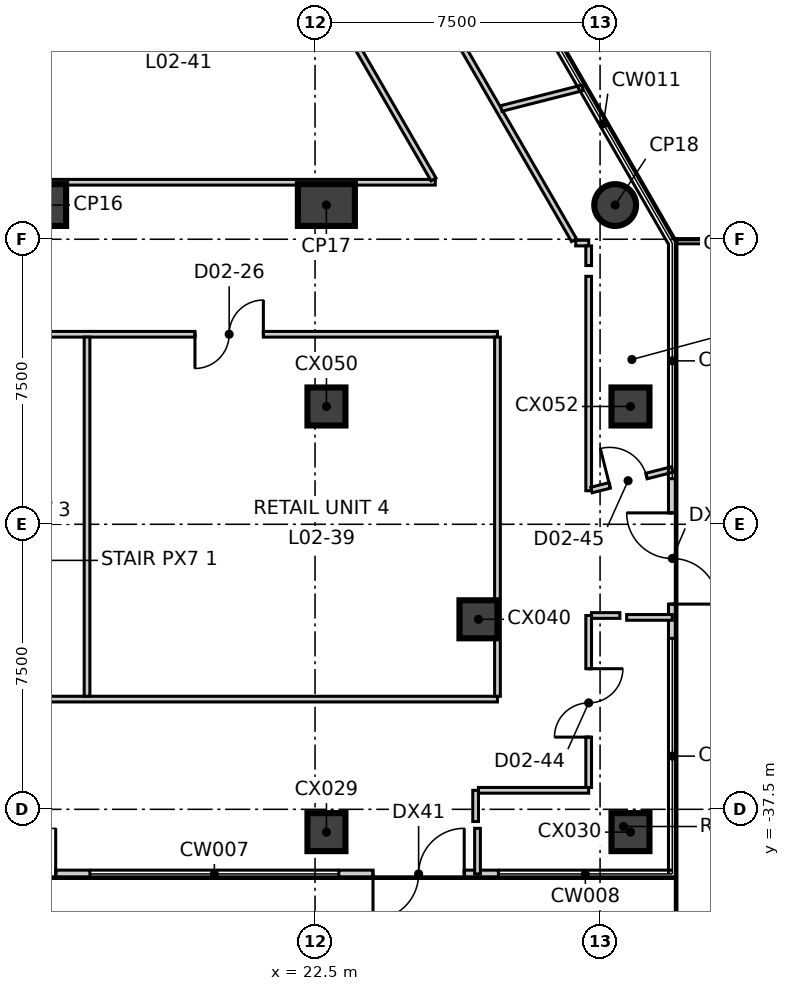
"""IFC4 building model, lengths in metres.
Left out: names, types, materials, properties, quantities, classifications, styles, units other than length and angle.
Written with IfcOpenShell. Run it as: python <this file> out.ifc"""

import sys

from ifc_helpers import new_model, si_unit, direction, frame, frame_2d, origin, origin_2d, place, context, subcontext, project, spatial, rectangle, circle, extrude, element, fill, save


model = new_model("IFC4")
c1 = context("Model", 3, precision=1e-05, world=origin(), true_north=direction((0.0, 1.0)))
c2 = subcontext(c1, "Body", "Model", "MODEL_VIEW")
j1 = project(units=[si_unit("LENGTHUNIT", "METRE"), si_unit("PLANEANGLEUNIT", "RADIAN")], contexts=[c1])
p1 = place(None, origin())
s1 = spatial("IfcSite", under=j1, at=p1, CompositionType="ELEMENT")
p2 = place(p1, origin())
s2 = spatial("IfcBuilding", under=s1, at=p2, CompositionType="ELEMENT")
p3 = place(p2, frame((0.0, 0.0, 14.5)))
s3 = spatial("IfcBuildingStorey", under=s2, at=p3, CompositionType="ELEMENT", Elevation=14.5)
for number, where, z_axis, x_axis in (
    (1, (15.199, -21.6, -0.4), (0.0, 0.0, 1.0), (1.0, 0.0, 0.0)),
    (2, (22.798, -21.6, -0.4), (0.0, 0.0, 1.0), (1.0, 0.0, 0.0)),
):
    element("IfcColumn", number, at=place(p3, frame(where, z_axis=z_axis, x_axis=x_axis)), inside=s3, PredefinedType="COLUMN", context=c2, shape_type="SweptSolid", body=[
        extrude(rectangle(XDim=1.5, YDim=1.1, at=origin_2d()), origin(), (0.0, 0.0, 1.0), 5.4),
    ])
p4 = place(p3, frame((30.397, -21.6, -0.4), z_axis=(0.0, 0.0, 1.0), x_axis=(1.0, 0.0, 0.0)))
e3 = element("IfcColumn", 3, at=p4, inside=s3, PredefinedType="COLUMN", context=c2, shape_type="SweptSolid", body=[
    extrude(circle(Radius=0.55, at=origin_2d()), origin(), (0.0, 0.0, 1.0), 5.4),
])
for number, where, z_axis, x_axis in (
    (4, (22.8, -38.1, -0.4), (0.0, 0.0, 1.0), (1.0, 0.0, 0.0)),
    (5, (30.8, -38.1, -0.4), (0.0, 0.0, 1.0), (1.0, 0.0, 0.0)),
    (6, (26.8, -32.5, -0.4), (0.0, 0.0, 1.0), (1.0, 0.0, 0.0)),
    (7, (22.8, -26.9, -0.4), (0.0, 0.0, 1.0), (1.0, 0.0, 0.0)),
    (8, (30.8, -26.9, -0.4), (0.0, 0.0, 1.0), (1.0, 0.0, 0.0)),
):
    element("IfcColumn", number, at=place(p3, frame(where, z_axis=z_axis, x_axis=x_axis)), inside=s3, PredefinedType="COLUMN", context=c2, shape_type="SweptSolid", body=[
        extrude(rectangle(XDim=1.0, YDim=1.0, at=origin_2d()), origin(), (0.0, 0.0, 1.0), 5.4),
    ])
p5 = place(p3, frame((12.375, -39.2, 0.0), z_axis=(0.0, 0.0, 1.0), x_axis=(1.0, 0.0, 0.0)))
e9 = element("IfcWall", 9, at=p5, inside=s3, PredefinedType="ELEMENTEDWALL", context=c2, shape_type="SweptSolid", body=[
    extrude(rectangle(XDim=4.2, YDim=0.2, at=frame_2d((2.1, 0.0))), origin(), (0.0, 0.0, 1.0), 5.0),
])
p6 = place(p5, frame((0.9, 0.0, 0.0)))
e10 = element("IfcOpeningElement", 10, at=p6, cuts=e9, PredefinedType="OPENING", context=c2, shape_type="SweptSolid", body=[
    extrude(rectangle(XDim=2.4, YDim=2.4, at=frame_2d((1.2, 1.2))), frame((0.0, 0.11, 0.0), z_axis=(0.0, -1.0, 0.0), x_axis=(1.0, 0.0, 0.0)), (0.0, 0.0, 1.0), 0.22),
])
p7 = place(p3, frame((23.125, -39.2, 0.0), z_axis=(0.0, 0.0, 1.0), x_axis=(1.0, 0.0, 0.0)))
e11 = element("IfcWall", 11, at=p7, inside=s3, PredefinedType="ELEMENTEDWALL", context=c2, shape_type="SweptSolid", body=[
    extrude(rectangle(XDim=4.2, YDim=0.2, at=frame_2d((2.1, 0.0))), origin(), (0.0, 0.0, 1.0), 5.0),
])
p8 = place(p7, frame((0.9, 0.0, 0.0)))
e12 = element("IfcOpeningElement", 12, at=p8, cuts=e11, PredefinedType="OPENING", context=c2, shape_type="SweptSolid", body=[
    extrude(rectangle(XDim=2.4, YDim=2.4, at=frame_2d((1.2, 1.2))), frame((0.0, 0.11, 0.0), z_axis=(0.0, -1.0, 0.0), x_axis=(1.0, 0.0, 0.0)), (0.0, 0.0, 1.0), 0.22),
])
p9 = place(p3, frame((31.9, -33.0, 0.0), z_axis=(0.0, 0.0, 1.0), x_axis=(0.0, 1.0, 0.0)))
e13 = element("IfcWall", 13, at=p9, inside=s3, PredefinedType="ELEMENTEDWALL", context=c2, shape_type="SweptSolid", body=[
    extrude(rectangle(XDim=4.2, YDim=0.2, at=frame_2d((2.1, 0.0))), origin(), (0.0, 0.0, 1.0), 5.0),
])
p10 = place(p9, frame((0.9, 0.0, 0.0)))
e14 = element("IfcOpeningElement", 14, at=p10, cuts=e13, PredefinedType="OPENING", context=c2, shape_type="SweptSolid", body=[
    extrude(rectangle(XDim=2.4, YDim=2.4, at=frame_2d((1.2, 1.2))), frame((0.0, 0.11, 0.0), z_axis=(0.0, -1.0, 0.0), x_axis=(1.0, 0.0, 0.0)), (0.0, 0.0, 1.0), 0.22),
])
p11 = place(p3, frame((29.358, -22.6, 0.0), z_axis=(0.0, 0.0, 1.0), x_axis=(1.0, 0.0, 0.0)))
e15 = element("IfcWall", 15, at=p11, inside=s3, PredefinedType="PARTITIONING", context=c2, shape_type="SweptSolid", body=[
    extrude(rectangle(XDim=0.342, YDim=0.15, at=frame_2d((0.171, 0.0))), origin(), (0.0, 0.0, 1.0), 5.0),
])
p12 = place(p3, frame((13.0, -34.6, 0.0), z_axis=(0.0, 0.0, 1.0), x_axis=(1.0, 0.0, 0.0)))
e16 = element("IfcWall", 16, at=p12, inside=s3, PredefinedType="PARTITIONING", context=c2, shape_type="SweptSolid", body=[
    extrude(rectangle(XDim=14.3, YDim=0.15, at=frame_2d((7.15, 0.0))), origin(), (0.0, 0.0, 1.0), 5.0),
])
p13 = place(p3, frame((9.6, -25.0, 0.0), z_axis=(0.0, 0.0, 1.0), x_axis=(1.0, 0.0, 0.0)))
e17 = element("IfcWall", 17, at=p13, inside=s3, PredefinedType="PARTITIONING", context=c2, shape_type="SweptSolid", body=[
    extrude(rectangle(XDim=17.7, YDim=0.15, at=frame_2d((8.85, 0.0))), origin(), (0.0, 0.0, 1.0), 5.0),
])
p14 = place(p13, frame((3.43, 0.0, 0.0)))
e18 = element("IfcOpeningElement", 18, at=p14, cuts=e17, PredefinedType="OPENING", context=c2, shape_type="SweptSolid", body=[
    extrude(rectangle(XDim=1.8, YDim=2.1, at=frame_2d((0.9, 1.05))), frame((0.0, 0.085, 0.0), z_axis=(0.0, -1.0, 0.0), x_axis=(1.0, 0.0, 0.0)), (0.0, 0.0, 1.0), 0.17),
])
p15 = place(p13, frame((9.74, 0.0, 0.0)))
e19 = element("IfcOpeningElement", 19, at=p15, cuts=e17, PredefinedType="OPENING", context=c2, shape_type="SweptSolid", body=[
    extrude(rectangle(XDim=1.8, YDim=2.1, at=frame_2d((0.9, 1.05))), frame((0.0, 0.085, 0.0), z_axis=(0.0, -1.0, 0.0), x_axis=(1.0, 0.0, 0.0)), (0.0, 0.0, 1.0), 0.17),
])
for number, where, z_axis, x_axis in (
    (20, (27.3, -34.525, 0.0), (0.0, 0.0, 1.0), (0.0, 1.0, 0.0)),
    (21, (16.5, -34.525, 0.0), (0.0, 0.0, 1.0), (0.0, 1.0, 0.0)),
):
    element("IfcWall", number, at=place(p3, frame(where, z_axis=z_axis, x_axis=x_axis)), inside=s3, PredefinedType="PARTITIONING", context=c2, shape_type="SweptSolid", body=[
        extrude(rectangle(XDim=9.45, YDim=0.15, at=frame_2d((4.725, 0.0))), origin(), (0.0, 0.0, 1.0), 5.0),
    ])
p16 = place(p3, frame((26.775, -39.2, 0.0), z_axis=(0.0, 0.0, 1.0), x_axis=(0.0, 1.0, 0.0)))
e22 = element("IfcWall", 22, at=p16, inside=s3, PredefinedType="PARTITIONING", context=c2, shape_type="SweptSolid", body=[
    extrude(rectangle(XDim=1.2, YDim=0.15, at=frame_2d((0.6, 0.0))), origin(), (0.0, 0.0, 1.0), 5.0),
])
p17 = place(p3, frame((26.725, -37.821, 0.0), z_axis=(0.0, 0.0, 1.0), x_axis=(0.0, 1.0, 0.0)))
e23 = element("IfcWall", 23, at=p17, inside=s3, PredefinedType="PARTITIONING", context=c2, shape_type="SweptSolid", body=[
    extrude(rectangle(XDim=0.821, YDim=0.15, at=frame_2d((0.411, 0.0))), origin(), (0.0, 0.0, 1.0), 5.0),
])
p18 = place(p3, frame((26.8, -37.0, 0.0), z_axis=(0.0, 0.0, 1.0), x_axis=(1.0, 0.0, 0.0)))
e24 = element("IfcWall", 24, at=p18, inside=s3, PredefinedType="PARTITIONING", context=c2, shape_type="SweptSolid", body=[
    extrude(rectangle(XDim=2.9, YDim=0.15, at=frame_2d((1.45, 0.0))), origin(), (0.0, 0.0, 1.0), 5.0),
])
p19 = place(p3, frame((29.7, -36.925, 0.0), z_axis=(0.0, 0.0, 1.0), x_axis=(0.0, 1.0, 0.0)))
e25 = element("IfcWall", 25, at=p19, inside=s3, PredefinedType="PARTITIONING", context=c2, shape_type="SweptSolid", body=[
    extrude(rectangle(XDim=4.525, YDim=0.15, at=frame_2d((2.263, 0.0))), origin(), (0.0, 0.0, 1.0), 5.0),
])
p20 = place(p19, frame((1.325, 0.0, 0.0)))
e26 = element("IfcOpeningElement", 26, at=p20, cuts=e25, PredefinedType="OPENING", context=c2, shape_type="SweptSolid", body=[
    extrude(rectangle(XDim=1.8, YDim=2.1, at=frame_2d((0.9, 1.05))), frame((0.0, 0.085, 0.0), z_axis=(0.0, -1.0, 0.0), x_axis=(1.0, 0.0, 0.0)), (0.0, 0.0, 1.0), 0.17),
])
p21 = place(p3, frame((29.7, -29.117, 0.0), z_axis=(0.0, 0.0, 1.0), x_axis=(0.0, 1.0, 0.0)))
e27 = element("IfcWall", 27, at=p21, inside=s3, PredefinedType="PARTITIONING", context=c2, shape_type="SweptSolid", body=[
    extrude(rectangle(XDim=5.642, YDim=0.15, at=frame_2d((2.821, 0.0))), origin(), (0.0, 0.0, 1.0), 5.0),
])
p22 = place(p3, frame((29.7, -23.192, 0.0), z_axis=(0.0, 0.0, 1.0), x_axis=(0.0, 1.0, 0.0)))
e28 = element("IfcWall", 28, at=p22, inside=s3, PredefinedType="PARTITIONING", context=c2, shape_type="SweptSolid", body=[
    extrude(rectangle(XDim=0.517, YDim=0.15, at=frame_2d((0.258, 0.0))), origin(), (0.0, 0.0, 1.0), 5.0),
])
p23 = place(p3, frame((29.775, -32.4, 0.0), z_axis=(0.0, 0.0, 1.0), x_axis=(1.0, 0.0, 0.0)))
e29 = element("IfcWall", 29, at=p23, inside=s3, PredefinedType="PARTITIONING", context=c2, shape_type="SweptSolid", body=[
    extrude(rectangle(XDim=0.746, YDim=0.15, at=frame_2d((0.373, 0.0))), origin(), (0.0, 0.0, 1.0), 5.0),
])
p24 = place(p3, frame((30.7, -32.45, 0.0), z_axis=(0.0, 0.0, 1.0), x_axis=(1.0, 0.0, 0.0)))
e30 = element("IfcWall", 30, at=p24, inside=s3, PredefinedType="PARTITIONING", context=c2, shape_type="SweptSolid", body=[
    extrude(rectangle(XDim=1.2, YDim=0.15, at=frame_2d((0.6, 0.0))), origin(), (0.0, 0.0, 1.0), 5.0),
])
p25 = place(p3, frame((24.509, -14.2, 0.0), z_axis=(0.0, 0.0, 1.0), x_axis=(0.499960629411, -0.866048133212, 0.0)))
e31 = element("IfcWall", 31, at=p25, inside=s3, PredefinedType="PARTITIONING", context=c2, shape_type="SweptSolid", body=[
    extrude(rectangle(XDim=9.613, YDim=0.15, at=frame_2d((4.806, 0.0))), origin(), (0.0, 0.0, 1.0), 5.0),
])
p26 = place(p3, frame((27.4, -19.059, 0.0), z_axis=(0.0, 0.0, 1.0), x_axis=(0.969159133182, 0.246435741258, 0.0)))
e32 = element("IfcWall", 32, at=p26, inside=s3, PredefinedType="PARTITIONING", context=c2, shape_type="SweptSolid", body=[
    extrude(rectangle(XDim=2.208, YDim=0.15, at=frame_2d((1.104, 0.0))), origin(), (0.0, 0.0, 1.0), 5.0),
])
p27 = place(p3, frame((29.775, -29.098, 0.0), z_axis=(0.0, 0.0, 1.0), x_axis=(0.969218538946, 0.246201997887, 0.0)))
e33 = element("IfcWall", 33, at=p27, inside=s3, PredefinedType="PARTITIONING", context=c2, shape_type="SweptSolid", body=[
    extrude(rectangle(XDim=2.192, YDim=0.15, at=frame_2d((1.096, 0.0))), origin(), (0.0, 0.0, 1.0), 5.0),
])
p28 = place(p27, frame((0.493, 0.0, 0.0)))
e34 = element("IfcOpeningElement", 34, at=p28, cuts=e33, PredefinedType="OPENING", context=c2, shape_type="SweptSolid", body=[
    extrude(rectangle(XDim=1.0, YDim=2.1, at=frame_2d((0.5, 1.05))), frame((0.0, 0.085, 0.0), z_axis=(0.0, -1.0, 0.0), x_axis=(1.0, 0.0, 0.0)), (0.0, 0.0, 1.0), 0.17),
])
p29 = place(p3, frame((15.0, -21.0, 0.0), z_axis=(0.0, 0.0, 1.0), x_axis=(1.0, 0.0, 0.0)))
e35 = element("IfcWall", 35, at=p29, inside=s3, PredefinedType="PARTITIONING", context=c2, shape_type="SweptSolid", body=[
    extrude(rectangle(XDim=10.663, YDim=0.15, at=frame_2d((5.332, 0.0))), origin(), (0.0, 0.0, 1.0), 5.0),
])
p30 = place(p3, frame((20.35, -11.801, 0.0), z_axis=(0.0, 0.0, 1.0), x_axis=(0.499894962398, -0.86608603878, 0.0)))
e36 = element("IfcWall", 36, at=p30, inside=s3, PredefinedType="PARTITIONING", context=c2, shape_type="SweptSolid", body=[
    extrude(rectangle(XDim=10.536, YDim=0.15, at=frame_2d((5.268, 0.0))), origin(), (0.0, 0.0, 1.0), 5.0),
])
p31 = place(p6, frame((2.4, 0.0, 0.0), z_axis=(0.0, 0.0, 1.0), x_axis=(-1.0, 0.0, 0.0)))
e37 = element("IfcDoor", 37, at=p31, inside=s3, OperationType="DOUBLE_DOOR_SINGLE_SWING", PredefinedType="DOOR", context=c2, shape_type="SweptSolid", body=[
    extrude(rectangle(XDim=2.4, YDim=2.4, at=frame_2d((1.2, 1.2))), frame((0.0, 0.025, 0.0), z_axis=(0.0, -1.0, 0.0), x_axis=(1.0, 0.0, 0.0)), (0.0, 0.0, 1.0), 0.05),
])
fill(e10, e37)
p32 = place(p8, frame((2.4, 0.0, 0.0), z_axis=(0.0, 0.0, 1.0), x_axis=(-1.0, 0.0, 0.0)))
e38 = element("IfcDoor", 38, at=p32, inside=s3, OperationType="DOUBLE_DOOR_SINGLE_SWING", PredefinedType="DOOR", context=c2, shape_type="SweptSolid", body=[
    extrude(rectangle(XDim=2.4, YDim=2.4, at=frame_2d((1.2, 1.2))), frame((0.0, 0.025, 0.0), z_axis=(0.0, -1.0, 0.0), x_axis=(1.0, 0.0, 0.0)), (0.0, 0.0, 1.0), 0.05),
])
fill(e12, e38)
p33 = place(p10, frame((2.4, 0.0, 0.0), z_axis=(0.0, 0.0, 1.0), x_axis=(-1.0, 0.0, 0.0)))
e39 = element("IfcDoor", 39, at=p33, inside=s3, OperationType="DOUBLE_DOOR_SINGLE_SWING", PredefinedType="DOOR", context=c2, shape_type="SweptSolid", body=[
    extrude(rectangle(XDim=2.4, YDim=2.4, at=frame_2d((1.2, 1.2))), frame((0.0, 0.025, 0.0), z_axis=(0.0, -1.0, 0.0), x_axis=(1.0, 0.0, 0.0)), (0.0, 0.0, 1.0), 0.05),
])
fill(e14, e39)
p34 = place(p15, origin())
e40 = element("IfcDoor", 40, at=p34, inside=s3, OperationType="DOUBLE_DOOR_SINGLE_SWING", PredefinedType="DOOR", context=c2, shape_type="SweptSolid", body=[
    extrude(rectangle(XDim=1.8, YDim=2.1, at=frame_2d((0.9, 1.05))), frame((0.0, 0.025, 0.0), z_axis=(0.0, -1.0, 0.0), x_axis=(1.0, 0.0, 0.0)), (0.0, 0.0, 1.0), 0.05),
])
fill(e19, e40)
p35 = place(p20, origin())
e41 = element("IfcDoor", 41, at=p35, inside=s3, OperationType="DOUBLE_DOOR_SINGLE_SWING", PredefinedType="DOOR", context=c2, shape_type="SweptSolid", body=[
    extrude(rectangle(XDim=1.8, YDim=2.1, at=frame_2d((0.9, 1.05))), frame((0.0, 0.025, 0.0), z_axis=(0.0, -1.0, 0.0), x_axis=(1.0, 0.0, 0.0)), (0.0, 0.0, 1.0), 0.05),
])
fill(e26, e41)
p36 = place(p28, origin())
e42 = element("IfcDoor", 42, at=p36, inside=s3, OperationType="SINGLE_SWING_RIGHT", PredefinedType="DOOR", context=c2, shape_type="SweptSolid", body=[
    extrude(rectangle(XDim=1.0, YDim=2.1, at=frame_2d((0.5, 1.05))), frame((0.0, 0.025, 0.0), z_axis=(0.0, -1.0, 0.0), x_axis=(1.0, 0.0, 0.0)), (0.0, 0.0, 1.0), 0.05),
])
fill(e34, e42)
save(model, sys.argv[1])
